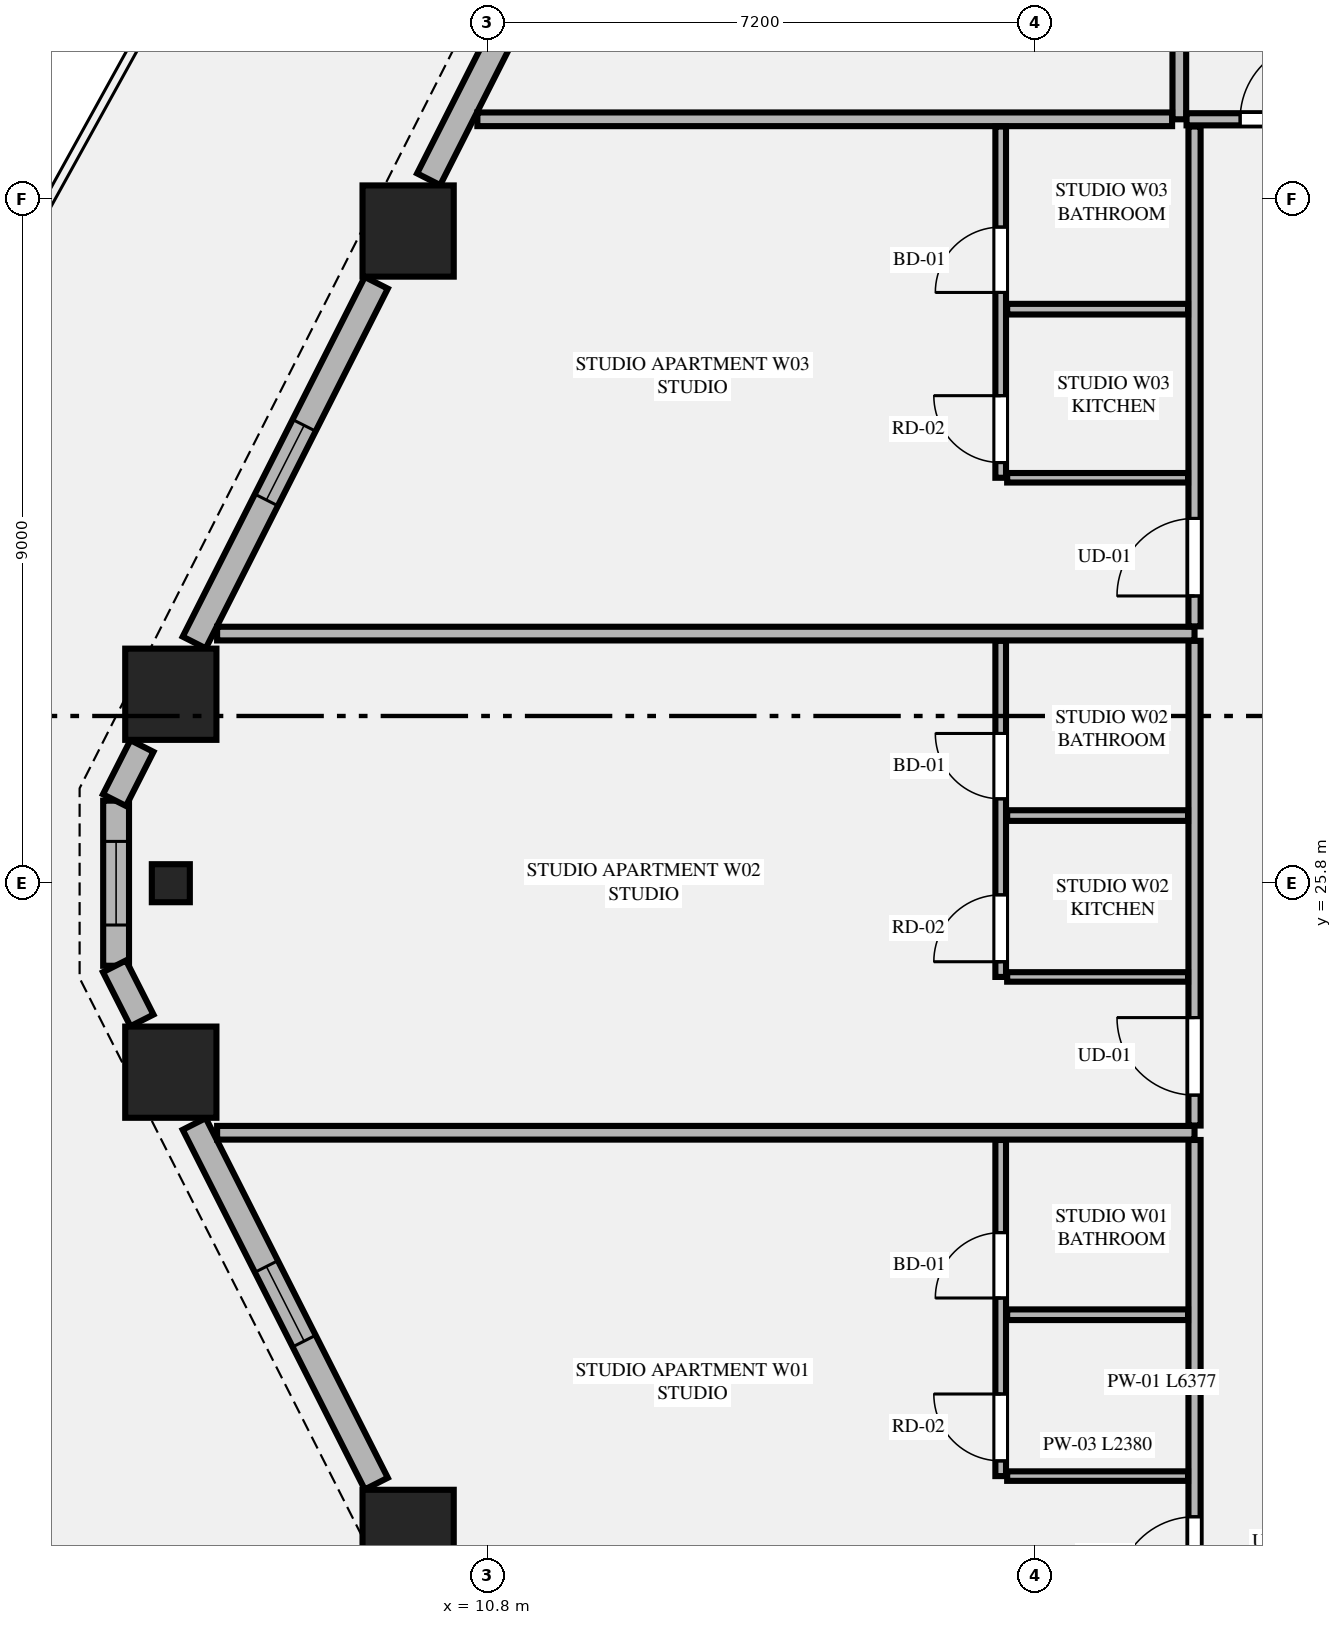
"""IFC4 building model, lengths in metres.
Left out: names, types, materials, properties, quantities, classifications, styles, units other than length and angle.
Written with IfcOpenShell. Run it as: python <this file> out.ifc"""

import sys

from ifc_helpers import new_model, si_unit, direction, frame, frame_2d, origin, origin_2d, place, context, subcontext, project, spatial, rectangle, extrude, element, fill, save


model = new_model("IFC4")
c1 = context("Model", 3, precision=1e-05, world=origin(), true_north=direction((0.0, 1.0)))
c2 = subcontext(c1, "Body", "Model", "MODEL_VIEW")
j1 = project(units=[si_unit("LENGTHUNIT", "METRE"), si_unit("PLANEANGLEUNIT", "RADIAN")], contexts=[c1])
p1 = place(None, origin())
s1 = spatial("IfcSite", under=j1, at=p1, CompositionType="ELEMENT")
p2 = place(p1, origin())
s2 = spatial("IfcBuilding", under=s1, at=p2, CompositionType="ELEMENT")
p3 = place(p2, frame((0.0, 0.0, 24.9)))
s3 = spatial("IfcBuildingStorey", under=s2, at=p3, CompositionType="ELEMENT", Elevation=24.9)
for number, where, z_axis, x_axis in (
    (1, (9.754, 34.38, 0.0), (0.0, 0.0, 1.0), (1.0, 0.0, 0.0)),
    (2, (6.632, 28.286, 0.0), (0.0, 0.0, 1.0), (1.0, 0.0, 0.0)),
    (3, (6.632, 23.314, 0.0), (0.0, 0.0, 1.0), (1.0, 0.0, 0.0)),
    (4, (9.754, 17.22, 0.0), (0.0, 0.0, 1.0), (1.0, 0.0, 0.0)),
):
    element("IfcColumn", number, at=place(p3, frame(where, z_axis=z_axis, x_axis=x_axis)), inside=s3, PredefinedType="COLUMN", context=c2, shape_type="SweptSolid", body=[
        extrude(rectangle(XDim=1.2, YDim=1.2, at=origin_2d()), origin(), (0.0, 0.0, 1.0), 3.55),
    ])
p4 = place(p3, frame((6.632, 25.8, 0.0), z_axis=(0.0, 0.0, 1.0), x_axis=(0.0, -1.0, 0.0)))
e5 = element("IfcColumn", 5, at=p4, inside=s3, PredefinedType="PILASTER", context=c2, shape_type="SweptSolid", body=[
    extrude(rectangle(XDim=0.5, YDim=0.35, at=origin_2d()), origin(), (0.0, 0.0, 1.0), 3.55),
])
p5 = place(p3, frame((5.912, 26.886, 0.0), z_axis=(0.0, 0.0, 1.0), x_axis=(0.0, -1.0, 0.0)))
e6 = element("IfcWall", 6, at=p5, inside=s3, PredefinedType="STANDARD", context=c2, shape_type="SweptSolid", body=[
    extrude(rectangle(XDim=2.172, YDim=0.34, at=frame_2d((1.086, 0.0))), origin(), (0.0, 0.0, 1.0), 3.33),
])
p6 = place(p5, frame((0.536, 0.0, 0.75)))
e7 = element("IfcOpeningElement", 7, at=p6, cuts=e6, PredefinedType="OPENING", context=c2, shape_type="SweptSolid", body=[
    extrude(rectangle(XDim=1.1, YDim=2.0, at=frame_2d((0.55, 1.0))), frame((0.0, 0.18, 0.0), z_axis=(0.0, -1.0, 0.0), x_axis=(1.0, 0.0, 0.0)), (0.0, 0.0, 1.0), 0.36),
])
p7 = place(p3, frame((12.529, 40.01, 0.0), z_axis=(0.0, 0.0, 1.0), x_axis=(-0.451627137896, -0.892206774417, 0.0)))
e8 = element("IfcWall", 8, at=p7, inside=s3, PredefinedType="STANDARD", context=c2, shape_type="SweptSolid", body=[
    extrude(rectangle(XDim=5.547, YDim=0.34, at=frame_2d((2.773, 0.0))), origin(), (0.0, 0.0, 1.0), 2.787),
])
p8 = place(p7, frame((2.223, 0.0, 0.75)))
e9 = element("IfcOpeningElement", 9, at=p8, cuts=e8, PredefinedType="OPENING", context=c2, shape_type="SweptSolid", body=[
    extrude(rectangle(XDim=1.1, YDim=1.887, at=frame_2d((0.55, 0.943))), frame((0.0, 0.18, 0.0), z_axis=(0.0, -1.0, 0.0), x_axis=(1.0, 0.0, 0.0)), (0.0, 0.0, 1.0), 0.36),
])
p9 = place(p3, frame((9.335, 33.699, 0.0), z_axis=(0.0, 0.0, 1.0), x_axis=(-0.451590635984, -0.892225250422, 0.0)))
e10 = element("IfcWall", 10, at=p9, inside=s3, PredefinedType="STANDARD", context=c2, shape_type="SweptSolid", body=[
    extrude(rectangle(XDim=5.303, YDim=0.34, at=frame_2d((2.652, 0.0))), origin(), (0.0, 0.0, 1.0), 2.787),
])
p10 = place(p9, frame((2.102, 0.0, 0.75)))
e11 = element("IfcOpeningElement", 11, at=p10, cuts=e10, PredefinedType="OPENING", context=c2, shape_type="SweptSolid", body=[
    extrude(rectangle(XDim=1.1, YDim=1.887, at=frame_2d((0.55, 0.943))), frame((0.0, 0.18, 0.0), z_axis=(0.0, -1.0, 0.0), x_axis=(1.0, 0.0, 0.0)), (0.0, 0.0, 1.0), 0.36),
])
for number, where, z_axis, x_axis in (
    (12, (6.252, 27.605, 0.0), (0.0, 0.0, 1.0), (-0.452, -0.892, 0.0)),
    (13, (5.891, 24.707, 0.0), (0.0, 0.0, 1.0), (0.452, -0.892, 0.0)),
):
    element("IfcWall", number, at=place(p3, frame(where, z_axis=z_axis, x_axis=x_axis)), inside=s3, PredefinedType="STANDARD", context=c2, shape_type="SweptSolid", body=[
        extrude(rectangle(XDim=0.798, YDim=0.34, at=frame_2d((0.399, 0.0))), origin(), (0.0, 0.0, 1.0), 3.33),
    ])
p11 = place(p3, frame((6.94, 22.633, 0.0), z_axis=(0.0, 0.0, 1.0), x_axis=(0.451572088722, -0.892234637686, 0.0)))
e14 = element("IfcWall", 14, at=p11, inside=s3, PredefinedType="STANDARD", context=c2, shape_type="SweptSolid", body=[
    extrude(rectangle(XDim=5.304, YDim=0.34, at=frame_2d((2.652, 0.0))), origin(), (0.0, 0.0, 1.0), 2.787),
])
p12 = place(p11, frame((2.102, 0.0, 0.75)))
e15 = element("IfcOpeningElement", 15, at=p12, cuts=e14, PredefinedType="OPENING", context=c2, shape_type="SweptSolid", body=[
    extrude(rectangle(XDim=1.1, YDim=1.887, at=frame_2d((0.55, 0.943))), frame((0.0, 0.18, 0.0), z_axis=(0.0, -1.0, 0.0), x_axis=(1.0, 0.0, 0.0)), (0.0, 0.0, 1.0), 0.36),
])
p13 = place(p3, frame((19.9, 35.85, 0.0), z_axis=(0.0, 0.0, 1.0), x_axis=(0.0, 1.0, 0.0)))
e16 = element("IfcWall", 16, at=p13, inside=s3, PredefinedType="PARTITIONING", context=c2, shape_type="SweptSolid", body=[
    extrude(rectangle(XDim=13.295, YDim=0.18, at=frame_2d((6.647, 0.0))), origin(), (0.0, 0.0, 1.0), 3.33),
])
p14 = place(p3, frame((19.995, 35.85, 0.0), z_axis=(0.0, 0.0, 1.0), x_axis=(1.0, 0.0, 0.0)))
e17 = element("IfcWall", 17, at=p14, inside=s3, PredefinedType="PARTITIONING", context=c2, shape_type="SweptSolid", body=[
    extrude(rectangle(XDim=8.188, YDim=0.16, at=frame_2d((4.094, 0.0))), origin(), (0.0, 0.0, 1.0), 3.33),
])
p15 = place(p14, frame((0.705, 0.0, 0.0)))
e18 = element("IfcOpeningElement", 18, at=p15, cuts=e17, PredefinedType="OPENING", context=c2, shape_type="SweptSolid", body=[
    extrude(rectangle(XDim=1.02, YDim=2.25, at=frame_2d((0.51, 1.125))), frame((0.0, 0.09, 0.0), z_axis=(0.0, -1.0, 0.0), x_axis=(1.0, 0.0, 0.0)), (0.0, 0.0, 1.0), 0.18),
])
p16 = place(p3, frame((10.665, 35.85, 0.0), z_axis=(0.0, 0.0, 1.0), x_axis=(1.0, 0.0, 0.0)))
e19 = element("IfcWall", 19, at=p16, inside=s3, PredefinedType="PARTITIONING", context=c2, shape_type="SweptSolid", body=[
    extrude(rectangle(XDim=9.14, YDim=0.18, at=frame_2d((4.57, 0.0))), origin(), (0.0, 0.0, 1.0), 3.33),
])
p17 = place(p3, frame((20.1, 16.045, 0.0), z_axis=(0.0, 0.0, 1.0), x_axis=(0.0, 1.0, 0.0)))
e20 = element("IfcWall", 20, at=p17, inside=s3, PredefinedType="PARTITIONING", context=c2, shape_type="SweptSolid", body=[
    extrude(rectangle(XDim=6.377, YDim=0.16, at=frame_2d((3.188, 0.0))), origin(), (0.0, 0.0, 1.0), 3.33),
])
p18 = place(p17, frame((0.4, 0.0, 0.0)))
e21 = element("IfcOpeningElement", 21, at=p18, cuts=e20, PredefinedType="OPENING", context=c2, shape_type="SweptSolid", body=[
    extrude(rectangle(XDim=1.02, YDim=2.25, at=frame_2d((0.51, 1.125))), frame((0.0, 0.09, 0.0), z_axis=(0.0, -1.0, 0.0), x_axis=(1.0, 0.0, 0.0)), (0.0, 0.0, 1.0), 0.18),
])
p19 = place(p3, frame((17.635, 18.0, 0.0), z_axis=(0.0, 0.0, 1.0), x_axis=(1.0, 0.0, 0.0)))
e22 = element("IfcWall", 22, at=p19, inside=s3, PredefinedType="PARTITIONING", context=c2, shape_type="SweptSolid", body=[
    extrude(rectangle(XDim=2.38, YDim=0.125, at=frame_2d((1.19, 0.0))), origin(), (0.0, 0.0, 1.0), 2.637),
])
p20 = place(p3, frame((17.55, 18.0, 0.0), z_axis=(0.0, 0.0, 1.0), x_axis=(0.0, 1.0, 0.0)))
e23 = element("IfcWall", 23, at=p20, inside=s3, PredefinedType="PLUMBINGWALL", context=c2, shape_type="SweptSolid", body=[
    extrude(rectangle(XDim=4.422, YDim=0.14, at=frame_2d((2.211, 0.0))), origin(), (0.0, 0.0, 1.0), 3.33),
])
p21 = place(p20, frame((2.343, 0.0, 0.0)))
e24 = element("IfcOpeningElement", 24, at=p21, cuts=e23, PredefinedType="OPENING", context=c2, shape_type="SweptSolid", body=[
    extrude(rectangle(XDim=0.86, YDim=2.1, at=frame_2d((0.43, 1.05))), frame((0.0, 0.08, 0.0), z_axis=(0.0, -1.0, 0.0), x_axis=(1.0, 0.0, 0.0)), (0.0, 0.0, 1.0), 0.16),
])
p22 = place(p20, frame((0.2, 0.0, 0.0)))
e25 = element("IfcOpeningElement", 25, at=p22, cuts=e23, PredefinedType="OPENING", context=c2, shape_type="SweptSolid", body=[
    extrude(rectangle(XDim=0.88, YDim=2.15, at=frame_2d((0.44, 1.075))), frame((0.0, 0.08, 0.0), z_axis=(0.0, -1.0, 0.0), x_axis=(1.0, 0.0, 0.0)), (0.0, 0.0, 1.0), 0.16),
])
p23 = place(p3, frame((17.635, 20.123, 0.0), z_axis=(0.0, 0.0, 1.0), x_axis=(1.0, 0.0, 0.0)))
e26 = element("IfcWall", 26, at=p23, inside=s3, PredefinedType="PLUMBINGWALL", context=c2, shape_type="SweptSolid", body=[
    extrude(rectangle(XDim=2.38, YDim=0.14, at=frame_2d((1.19, 0.0))), origin(), (0.0, 0.0, 1.0), 3.33),
])
p24 = place(p3, frame((7.241, 22.517, 0.0), z_axis=(0.0, 0.0, 1.0), x_axis=(1.0, 0.0, 0.0)))
e27 = element("IfcWall", 27, at=p24, inside=s3, PredefinedType="PARTITIONING", context=c2, shape_type="SweptSolid", body=[
    extrude(rectangle(XDim=12.859, YDim=0.18, at=frame_2d((6.43, 0.0))), origin(), (0.0, 0.0, 1.0), 3.33),
])
p25 = place(p3, frame((20.1, 22.612, 0.0), z_axis=(0.0, 0.0, 1.0), x_axis=(0.0, 1.0, 0.0)))
e28 = element("IfcWall", 28, at=p25, inside=s3, PredefinedType="PARTITIONING", context=c2, shape_type="SweptSolid", body=[
    extrude(rectangle(XDim=6.377, YDim=0.16, at=frame_2d((3.188, 0.0))), origin(), (0.0, 0.0, 1.0), 3.33),
])
p26 = place(p25, frame((0.4, 0.0, 0.0)))
e29 = element("IfcOpeningElement", 29, at=p26, cuts=e28, PredefinedType="OPENING", context=c2, shape_type="SweptSolid", body=[
    extrude(rectangle(XDim=1.02, YDim=2.25, at=frame_2d((0.51, 1.125))), frame((0.0, 0.09, 0.0), z_axis=(0.0, -1.0, 0.0), x_axis=(1.0, 0.0, 0.0)), (0.0, 0.0, 1.0), 0.18),
])
p27 = place(p3, frame((17.635, 24.567, 0.0), z_axis=(0.0, 0.0, 1.0), x_axis=(1.0, 0.0, 0.0)))
e30 = element("IfcWall", 30, at=p27, inside=s3, PredefinedType="PARTITIONING", context=c2, shape_type="SweptSolid", body=[
    extrude(rectangle(XDim=2.38, YDim=0.125, at=frame_2d((1.19, 0.0))), origin(), (0.0, 0.0, 1.0), 3.33),
])
p28 = place(p3, frame((17.55, 24.567, 0.0), z_axis=(0.0, 0.0, 1.0), x_axis=(0.0, 1.0, 0.0)))
e31 = element("IfcWall", 31, at=p28, inside=s3, PredefinedType="PLUMBINGWALL", context=c2, shape_type="SweptSolid", body=[
    extrude(rectangle(XDim=4.422, YDim=0.14, at=frame_2d((2.211, 0.0))), origin(), (0.0, 0.0, 1.0), 3.33),
])
p29 = place(p28, frame((2.343, 0.0, 0.0)))
e32 = element("IfcOpeningElement", 32, at=p29, cuts=e31, PredefinedType="OPENING", context=c2, shape_type="SweptSolid", body=[
    extrude(rectangle(XDim=0.86, YDim=2.1, at=frame_2d((0.43, 1.05))), frame((0.0, 0.08, 0.0), z_axis=(0.0, -1.0, 0.0), x_axis=(1.0, 0.0, 0.0)), (0.0, 0.0, 1.0), 0.16),
])
p30 = place(p28, frame((0.2, 0.0, 0.0)))
e33 = element("IfcOpeningElement", 33, at=p30, cuts=e31, PredefinedType="OPENING", context=c2, shape_type="SweptSolid", body=[
    extrude(rectangle(XDim=0.88, YDim=2.15, at=frame_2d((0.44, 1.075))), frame((0.0, 0.08, 0.0), z_axis=(0.0, -1.0, 0.0), x_axis=(1.0, 0.0, 0.0)), (0.0, 0.0, 1.0), 0.16),
])
p31 = place(p3, frame((17.635, 26.69, 0.0), z_axis=(0.0, 0.0, 1.0), x_axis=(1.0, 0.0, 0.0)))
e34 = element("IfcWall", 34, at=p31, inside=s3, PredefinedType="PLUMBINGWALL", context=c2, shape_type="SweptSolid", body=[
    extrude(rectangle(XDim=2.38, YDim=0.14, at=frame_2d((1.19, 0.0))), origin(), (0.0, 0.0, 1.0), 3.33),
])
p32 = place(p3, frame((7.241, 29.084, 0.0), z_axis=(0.0, 0.0, 1.0), x_axis=(1.0, 0.0, 0.0)))
e35 = element("IfcWall", 35, at=p32, inside=s3, PredefinedType="PARTITIONING", context=c2, shape_type="SweptSolid", body=[
    extrude(rectangle(XDim=12.859, YDim=0.18, at=frame_2d((6.43, 0.0))), origin(), (0.0, 0.0, 1.0), 3.33),
])
p33 = place(p3, frame((20.1, 29.179, 0.0), z_axis=(0.0, 0.0, 1.0), x_axis=(0.0, 1.0, 0.0)))
e36 = element("IfcWall", 36, at=p33, inside=s3, PredefinedType="PARTITIONING", context=c2, shape_type="SweptSolid", body=[
    extrude(rectangle(XDim=6.576, YDim=0.16, at=frame_2d((3.288, 0.0))), origin(), (0.0, 0.0, 1.0), 3.33),
])
p34 = place(p33, frame((0.4, 0.0, 0.0)))
e37 = element("IfcOpeningElement", 37, at=p34, cuts=e36, PredefinedType="OPENING", context=c2, shape_type="SweptSolid", body=[
    extrude(rectangle(XDim=1.02, YDim=2.25, at=frame_2d((0.51, 1.125))), frame((0.0, 0.09, 0.0), z_axis=(0.0, -1.0, 0.0), x_axis=(1.0, 0.0, 0.0)), (0.0, 0.0, 1.0), 0.18),
])
p35 = place(p3, frame((17.635, 31.134, 0.0), z_axis=(0.0, 0.0, 1.0), x_axis=(1.0, 0.0, 0.0)))
e38 = element("IfcWall", 38, at=p35, inside=s3, PredefinedType="PARTITIONING", context=c2, shape_type="SweptSolid", body=[
    extrude(rectangle(XDim=2.38, YDim=0.125, at=frame_2d((1.19, 0.0))), origin(), (0.0, 0.0, 1.0), 3.33),
])
p36 = place(p3, frame((17.55, 31.134, 0.0), z_axis=(0.0, 0.0, 1.0), x_axis=(0.0, 1.0, 0.0)))
e39 = element("IfcWall", 39, at=p36, inside=s3, PredefinedType="PLUMBINGWALL", context=c2, shape_type="SweptSolid", body=[
    extrude(rectangle(XDim=4.621, YDim=0.14, at=frame_2d((2.311, 0.0))), origin(), (0.0, 0.0, 1.0), 3.33),
])
p37 = place(p36, frame((2.438, 0.0, 0.0)))
e40 = element("IfcOpeningElement", 40, at=p37, cuts=e39, PredefinedType="OPENING", context=c2, shape_type="SweptSolid", body=[
    extrude(rectangle(XDim=0.86, YDim=2.1, at=frame_2d((0.43, 1.05))), frame((0.0, 0.08, 0.0), z_axis=(0.0, -1.0, 0.0), x_axis=(1.0, 0.0, 0.0)), (0.0, 0.0, 1.0), 0.16),
])
p38 = place(p36, frame((0.2, 0.0, 0.0)))
e41 = element("IfcOpeningElement", 41, at=p38, cuts=e39, PredefinedType="OPENING", context=c2, shape_type="SweptSolid", body=[
    extrude(rectangle(XDim=0.88, YDim=2.15, at=frame_2d((0.44, 1.075))), frame((0.0, 0.08, 0.0), z_axis=(0.0, -1.0, 0.0), x_axis=(1.0, 0.0, 0.0)), (0.0, 0.0, 1.0), 0.16),
])
p39 = place(p3, frame((17.635, 33.352, 0.0), z_axis=(0.0, 0.0, 1.0), x_axis=(1.0, 0.0, 0.0)))
e42 = element("IfcWall", 42, at=p39, inside=s3, PredefinedType="PLUMBINGWALL", context=c2, shape_type="SweptSolid", body=[
    extrude(rectangle(XDim=2.38, YDim=0.14, at=frame_2d((1.19, 0.0))), origin(), (0.0, 0.0, 1.0), 2.637),
])
p40 = place(p10, origin())
e43 = element("IfcWindow", 43, at=p40, inside=s3, PartitioningType="SINGLE_PANEL", PredefinedType="WINDOW", context=c2, shape_type="SweptSolid", body=[
    extrude(rectangle(XDim=1.1, YDim=1.887, at=frame_2d((0.55, 0.943))), frame((0.0, 0.03, 0.0), z_axis=(0.0, -1.0, 0.0), x_axis=(1.0, 0.0, 0.0)), (0.0, 0.0, 1.0), 0.06),
])
fill(e11, e43)
p41 = place(p12, origin())
e44 = element("IfcWindow", 44, at=p41, inside=s3, PartitioningType="SINGLE_PANEL", PredefinedType="WINDOW", context=c2, shape_type="SweptSolid", body=[
    extrude(rectangle(XDim=1.1, YDim=1.887, at=frame_2d((0.55, 0.943))), frame((0.0, 0.03, 0.0), z_axis=(0.0, -1.0, 0.0), x_axis=(1.0, 0.0, 0.0)), (0.0, 0.0, 1.0), 0.06),
])
fill(e15, e44)
p42 = place(p15, origin())
e45 = element("IfcDoor", 45, at=p42, inside=s3, OperationType="SINGLE_SWING_RIGHT", PredefinedType="DOOR", context=c2, shape_type="SweptSolid", body=[
    extrude(rectangle(XDim=1.02, YDim=2.25, at=frame_2d((0.51, 1.125))), frame((0.0, 0.025, 0.0), z_axis=(0.0, -1.0, 0.0), x_axis=(1.0, 0.0, 0.0)), (0.0, 0.0, 1.0), 0.05),
])
fill(e18, e45)
p43 = place(p21, origin())
e46 = element("IfcDoor", 46, at=p43, inside=s3, OperationType="SINGLE_SWING_LEFT", PredefinedType="DOOR", context=c2, shape_type="SweptSolid", body=[
    extrude(rectangle(XDim=0.86, YDim=2.1, at=frame_2d((0.43, 1.05))), frame((0.0, 0.025, 0.0), z_axis=(0.0, -1.0, 0.0), x_axis=(1.0, 0.0, 0.0)), (0.0, 0.0, 1.0), 0.05),
])
fill(e24, e46)
p44 = place(p18, origin())
e47 = element("IfcDoor", 47, at=p44, inside=s3, OperationType="SINGLE_SWING_LEFT", PredefinedType="DOOR", context=c2, shape_type="SweptSolid", body=[
    extrude(rectangle(XDim=1.02, YDim=2.25, at=frame_2d((0.51, 1.125))), frame((0.0, 0.025, 0.0), z_axis=(0.0, -1.0, 0.0), x_axis=(1.0, 0.0, 0.0)), (0.0, 0.0, 1.0), 0.05),
])
fill(e21, e47)
p45 = place(p22, origin())
e48 = element("IfcDoor", 48, at=p45, inside=s3, OperationType="SINGLE_SWING_RIGHT", PredefinedType="DOOR", context=c2, shape_type="SweptSolid", body=[
    extrude(rectangle(XDim=0.88, YDim=2.15, at=frame_2d((0.44, 1.075))), frame((0.0, 0.025, 0.0), z_axis=(0.0, -1.0, 0.0), x_axis=(1.0, 0.0, 0.0)), (0.0, 0.0, 1.0), 0.05),
])
fill(e25, e48)
p46 = place(p29, origin())
e49 = element("IfcDoor", 49, at=p46, inside=s3, OperationType="SINGLE_SWING_RIGHT", PredefinedType="DOOR", context=c2, shape_type="SweptSolid", body=[
    extrude(rectangle(XDim=0.86, YDim=2.1, at=frame_2d((0.43, 1.05))), frame((0.0, 0.025, 0.0), z_axis=(0.0, -1.0, 0.0), x_axis=(1.0, 0.0, 0.0)), (0.0, 0.0, 1.0), 0.05),
])
fill(e32, e49)
p47 = place(p26, origin())
e50 = element("IfcDoor", 50, at=p47, inside=s3, OperationType="SINGLE_SWING_RIGHT", PredefinedType="DOOR", context=c2, shape_type="SweptSolid", body=[
    extrude(rectangle(XDim=1.02, YDim=2.25, at=frame_2d((0.51, 1.125))), frame((0.0, 0.025, 0.0), z_axis=(0.0, -1.0, 0.0), x_axis=(1.0, 0.0, 0.0)), (0.0, 0.0, 1.0), 0.05),
])
fill(e29, e50)
p48 = place(p30, origin())
e51 = element("IfcDoor", 51, at=p48, inside=s3, OperationType="SINGLE_SWING_LEFT", PredefinedType="DOOR", context=c2, shape_type="SweptSolid", body=[
    extrude(rectangle(XDim=0.88, YDim=2.15, at=frame_2d((0.44, 1.075))), frame((0.0, 0.025, 0.0), z_axis=(0.0, -1.0, 0.0), x_axis=(1.0, 0.0, 0.0)), (0.0, 0.0, 1.0), 0.05),
])
fill(e33, e51)
p49 = place(p37, origin())
e52 = element("IfcDoor", 52, at=p49, inside=s3, OperationType="SINGLE_SWING_LEFT", PredefinedType="DOOR", context=c2, shape_type="SweptSolid", body=[
    extrude(rectangle(XDim=0.86, YDim=2.1, at=frame_2d((0.43, 1.05))), frame((0.0, 0.025, 0.0), z_axis=(0.0, -1.0, 0.0), x_axis=(1.0, 0.0, 0.0)), (0.0, 0.0, 1.0), 0.05),
])
fill(e40, e52)
p50 = place(p34, origin())
e53 = element("IfcDoor", 53, at=p50, inside=s3, OperationType="SINGLE_SWING_LEFT", PredefinedType="DOOR", context=c2, shape_type="SweptSolid", body=[
    extrude(rectangle(XDim=1.02, YDim=2.25, at=frame_2d((0.51, 1.125))), frame((0.0, 0.025, 0.0), z_axis=(0.0, -1.0, 0.0), x_axis=(1.0, 0.0, 0.0)), (0.0, 0.0, 1.0), 0.05),
])
fill(e37, e53)
p51 = place(p38, origin())
e54 = element("IfcDoor", 54, at=p51, inside=s3, OperationType="SINGLE_SWING_RIGHT", PredefinedType="DOOR", context=c2, shape_type="SweptSolid", body=[
    extrude(rectangle(XDim=0.88, YDim=2.15, at=frame_2d((0.44, 1.075))), frame((0.0, 0.025, 0.0), z_axis=(0.0, -1.0, 0.0), x_axis=(1.0, 0.0, 0.0)), (0.0, 0.0, 1.0), 0.05),
])
fill(e41, e54)
p52 = place(p6, origin())
e55 = element("IfcWindow", 55, at=p52, inside=s3, PartitioningType="SINGLE_PANEL", PredefinedType="WINDOW", context=c2, shape_type="SweptSolid", body=[
    extrude(rectangle(XDim=1.1, YDim=2.0, at=frame_2d((0.55, 1.0))), frame((0.0, 0.03, 0.0), z_axis=(0.0, -1.0, 0.0), x_axis=(1.0, 0.0, 0.0)), (0.0, 0.0, 1.0), 0.06),
])
fill(e7, e55)
save(model, sys.argv[1])
